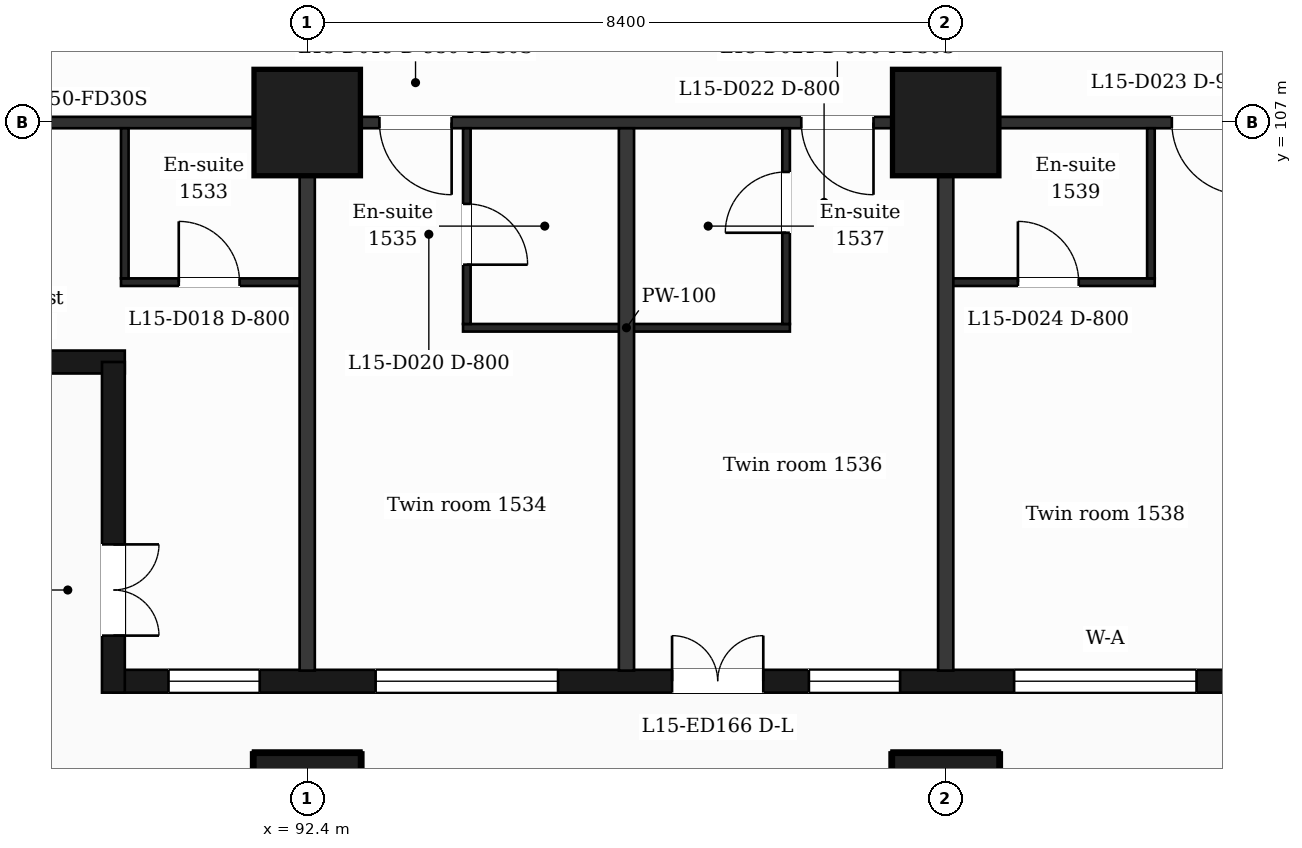
"""IFC4 building model, lengths in metres.
Left out: names, types, materials, properties, quantities, classifications, styles, units other than length and angle.
Written with IfcOpenShell. Run it as: python <this file> out.ifc"""

import sys

from ifc_helpers import new_model, si_unit, direction, frame, frame_2d, origin, origin_2d, place, context, subcontext, project, spatial, rectangle, extrude, element, fill, save


model = new_model("IFC4")
c1 = context("Model", 3, precision=1e-05, world=origin(), true_north=direction((0.0, 1.0)))
c2 = subcontext(c1, "Body", "Model", "MODEL_VIEW")
j1 = project(units=[si_unit("LENGTHUNIT", "METRE"), si_unit("PLANEANGLEUNIT", "RADIAN")], contexts=[c1])
p1 = place(None, origin())
s1 = spatial("IfcSite", under=j1, at=p1, CompositionType="ELEMENT")
p2 = place(p1, origin())
s2 = spatial("IfcBuilding", under=s1, at=p2, CompositionType="ELEMENT")
p3 = place(p2, frame((0.0, 0.0, 70.5)))
s3 = spatial("IfcBuildingStorey", under=s2, at=p3, CompositionType="ELEMENT", Elevation=70.5)
for number, where, z_axis, x_axis in (
    (1, (92.4, 98.0, 0.0), (0.0, 0.0, 1.0), (1.0, 0.0, 0.0)),
    (2, (100.8, 98.0, 0.0), (0.0, 0.0, 1.0), (1.0, 0.0, 0.0)),
    (3, (92.4, 107.0, 0.0), (0.0, 0.0, 1.0), (1.0, 0.0, 0.0)),
    (4, (100.8, 107.0, 0.0), (0.0, 0.0, 1.0), (1.0, 0.0, 0.0)),
):
    element("IfcColumn", number, at=place(p3, frame(where, z_axis=z_axis, x_axis=x_axis)), inside=s3, PredefinedType="COLUMN", context=c2, shape_type="SweptSolid", body=[
        extrude(rectangle(XDim=1.4, YDim=1.4, at=origin_2d()), origin(), (0.0, 0.0, 1.0), 3.5),
    ])
p4 = place(p3, frame((89.85, 99.65, 0.0), z_axis=(0.0, 0.0, 1.0), x_axis=(1.0, 0.0, 0.0)))
e5 = element("IfcWall", 5, at=p4, inside=s3, PredefinedType="SOLIDWALL", context=c2, shape_type="SweptSolid", body=[
    extrude(rectangle(XDim=47.25, YDim=0.3, at=frame_2d((23.625, 0.0))), origin(), (0.0, 0.0, 1.0), 3.18),
])
p5 = place(p4, frame((0.725, 0.0, 0.9)))
e6 = element("IfcOpeningElement", 6, at=p5, cuts=e5, PredefinedType="OPENING", context=c2, shape_type="SweptSolid", body=[
    extrude(rectangle(XDim=1.2, YDim=2.1, at=frame_2d((0.6, 1.05))), frame((0.0, 0.16, 0.0), z_axis=(0.0, -1.0, 0.0), x_axis=(1.0, 0.0, 0.0)), (0.0, 0.0, 1.0), 0.32),
])
p6 = place(p4, frame((3.45, 0.0, 0.9)))
e7 = element("IfcOpeningElement", 7, at=p6, cuts=e5, PredefinedType="OPENING", context=c2, shape_type="SweptSolid", body=[
    extrude(rectangle(XDim=2.4, YDim=2.1, at=frame_2d((1.2, 1.05))), frame((0.0, 0.16, 0.0), z_axis=(0.0, -1.0, 0.0), x_axis=(1.0, 0.0, 0.0)), (0.0, 0.0, 1.0), 0.32),
])
p7 = place(p4, frame((7.35, 0.0, 0.0)))
e8 = element("IfcOpeningElement", 8, at=p7, cuts=e5, PredefinedType="OPENING", context=c2, shape_type="SweptSolid", body=[
    extrude(rectangle(XDim=1.2, YDim=2.4, at=frame_2d((0.6, 1.2))), frame((0.0, 0.16, 0.0), z_axis=(0.0, -1.0, 0.0), x_axis=(1.0, 0.0, 0.0)), (0.0, 0.0, 1.0), 0.32),
])
p8 = place(p4, frame((9.15, 0.0, 0.9)))
e9 = element("IfcOpeningElement", 9, at=p8, cuts=e5, PredefinedType="OPENING", context=c2, shape_type="SweptSolid", body=[
    extrude(rectangle(XDim=1.2, YDim=2.1, at=frame_2d((0.6, 1.05))), frame((0.0, 0.16, 0.0), z_axis=(0.0, -1.0, 0.0), x_axis=(1.0, 0.0, 0.0)), (0.0, 0.0, 1.0), 0.32),
])
p9 = place(p4, frame((11.85, 0.0, 0.9)))
e10 = element("IfcOpeningElement", 10, at=p9, cuts=e5, PredefinedType="OPENING", context=c2, shape_type="SweptSolid", body=[
    extrude(rectangle(XDim=2.4, YDim=2.1, at=frame_2d((1.2, 1.05))), frame((0.0, 0.16, 0.0), z_axis=(0.0, -1.0, 0.0), x_axis=(1.0, 0.0, 0.0)), (0.0, 0.0, 1.0), 0.32),
])
p10 = place(p4, frame((16.05, 0.0, 0.9)))
e11 = element("IfcOpeningElement", 11, at=p10, cuts=e5, PredefinedType="OPENING", context=c2, shape_type="SweptSolid", body=[
    extrude(rectangle(XDim=2.4, YDim=2.1, at=frame_2d((1.2, 1.05))), frame((0.0, 0.16, 0.0), z_axis=(0.0, -1.0, 0.0), x_axis=(1.0, 0.0, 0.0)), (0.0, 0.0, 1.0), 0.32),
])
p11 = place(p4, frame((20.85, 0.0, 0.9)))
e12 = element("IfcOpeningElement", 12, at=p11, cuts=e5, PredefinedType="OPENING", context=c2, shape_type="SweptSolid", body=[
    extrude(rectangle(XDim=1.2, YDim=2.1, at=frame_2d((0.6, 1.05))), frame((0.0, 0.16, 0.0), z_axis=(0.0, -1.0, 0.0), x_axis=(1.0, 0.0, 0.0)), (0.0, 0.0, 1.0), 0.32),
])
p12 = place(p4, frame((25.05, 0.0, 0.9)))
e13 = element("IfcOpeningElement", 13, at=p12, cuts=e5, PredefinedType="OPENING", context=c2, shape_type="SweptSolid", body=[
    extrude(rectangle(XDim=1.2, YDim=2.1, at=frame_2d((0.6, 1.05))), frame((0.0, 0.16, 0.0), z_axis=(0.0, -1.0, 0.0), x_axis=(1.0, 0.0, 0.0)), (0.0, 0.0, 1.0), 0.32),
])
p13 = place(p4, frame((28.65, 0.0, 0.9)))
e14 = element("IfcOpeningElement", 14, at=p13, cuts=e5, PredefinedType="OPENING", context=c2, shape_type="SweptSolid", body=[
    extrude(rectangle(XDim=2.4, YDim=2.1, at=frame_2d((1.2, 1.05))), frame((0.0, 0.16, 0.0), z_axis=(0.0, -1.0, 0.0), x_axis=(1.0, 0.0, 0.0)), (0.0, 0.0, 1.0), 0.32),
])
p14 = place(p4, frame((32.85, 0.0, 0.9)))
e15 = element("IfcOpeningElement", 15, at=p14, cuts=e5, PredefinedType="OPENING", context=c2, shape_type="SweptSolid", body=[
    extrude(rectangle(XDim=2.4, YDim=2.1, at=frame_2d((1.2, 1.05))), frame((0.0, 0.16, 0.0), z_axis=(0.0, -1.0, 0.0), x_axis=(1.0, 0.0, 0.0)), (0.0, 0.0, 1.0), 0.32),
])
p15 = place(p4, frame((37.05, 0.0, 0.9)))
e16 = element("IfcOpeningElement", 16, at=p15, cuts=e5, PredefinedType="OPENING", context=c2, shape_type="SweptSolid", body=[
    extrude(rectangle(XDim=2.4, YDim=2.1, at=frame_2d((1.2, 1.05))), frame((0.0, 0.16, 0.0), z_axis=(0.0, -1.0, 0.0), x_axis=(1.0, 0.0, 0.0)), (0.0, 0.0, 1.0), 0.32),
])
p16 = place(p4, frame((41.25, 0.0, 0.9)))
e17 = element("IfcOpeningElement", 17, at=p16, cuts=e5, PredefinedType="OPENING", context=c2, shape_type="SweptSolid", body=[
    extrude(rectangle(XDim=2.4, YDim=2.1, at=frame_2d((1.2, 1.05))), frame((0.0, 0.16, 0.0), z_axis=(0.0, -1.0, 0.0), x_axis=(1.0, 0.0, 0.0)), (0.0, 0.0, 1.0), 0.32),
])
p17 = place(p4, frame((45.25, 0.0, 0.9)))
e18 = element("IfcOpeningElement", 18, at=p17, cuts=e5, PredefinedType="OPENING", context=c2, shape_type="SweptSolid", body=[
    extrude(rectangle(XDim=1.2, YDim=2.1, at=frame_2d((0.6, 1.05))), frame((0.0, 0.16, 0.0), z_axis=(0.0, -1.0, 0.0), x_axis=(1.0, 0.0, 0.0)), (0.0, 0.0, 1.0), 0.32),
])
p18 = place(p3, frame((86.452, 103.85, 0.0), z_axis=(0.0, 0.0, 1.0), x_axis=(1.0, 0.0, 0.0)))
e19 = element("IfcWall", 19, at=p18, inside=s3, PredefinedType="SOLIDWALL", context=c2, shape_type="SweptSolid", body=[
    extrude(rectangle(XDim=3.548, YDim=0.3, at=frame_2d((1.774, 0.0))), origin(), (0.0, 0.0, 1.0), 3.18),
])
p19 = place(p3, frame((89.85, 103.85, 0.0), z_axis=(0.0, 0.0, 1.0), x_axis=(0.0, -1.0, 0.0)))
e20 = element("IfcWall", 20, at=p19, inside=s3, PredefinedType="SOLIDWALL", context=c2, shape_type="SweptSolid", body=[
    extrude(rectangle(XDim=4.35, YDim=0.3, at=frame_2d((2.175, 0.0))), origin(), (0.0, 0.0, 1.0), 3.18),
])
p20 = place(p19, frame((2.4, 0.0, 0.0)))
e21 = element("IfcOpeningElement", 21, at=p20, cuts=e20, PredefinedType="OPENING", context=c2, shape_type="SweptSolid", body=[
    extrude(rectangle(XDim=1.2, YDim=2.4, at=frame_2d((0.6, 1.2))), frame((0.0, 0.16, 0.0), z_axis=(0.0, -1.0, 0.0), x_axis=(1.0, 0.0, 0.0)), (0.0, 0.0, 1.0), 0.32),
])
p21 = place(p3, frame((94.45, 104.3, 0.0), z_axis=(0.0, 0.0, 1.0), x_axis=(1.0, 0.0, 0.0)))
e22 = element("IfcWall", 22, at=p21, inside=s3, PredefinedType="PARTITIONING", context=c2, shape_type="SweptSolid", body=[
    extrude(rectangle(XDim=4.3, YDim=0.1, at=frame_2d((2.15, 0.0))), origin(), (0.0, 0.0, 1.0), 3.18),
])
p22 = place(p3, frame((89.95, 104.9, 0.0), z_axis=(0.0, 0.0, 1.0), x_axis=(1.0, 0.0, 0.0)))
e23 = element("IfcWall", 23, at=p22, inside=s3, PredefinedType="PARTITIONING", context=c2, shape_type="SweptSolid", body=[
    extrude(rectangle(XDim=2.45, YDim=0.1, at=frame_2d((1.225, 0.0))), origin(), (0.0, 0.0, 1.0), 3.18),
])
p23 = place(p22, frame((0.76, 0.0, 0.0)))
e24 = element("IfcOpeningElement", 24, at=p23, cuts=e23, PredefinedType="OPENING", context=c2, shape_type="SweptSolid", body=[
    extrude(rectangle(XDim=0.8, YDim=2.1, at=frame_2d((0.4, 1.05))), frame((0.0, 0.06, 0.0), z_axis=(0.0, -1.0, 0.0), x_axis=(1.0, 0.0, 0.0)), (0.0, 0.0, 1.0), 0.12),
])
p24 = place(p3, frame((100.8, 104.9, 0.0), z_axis=(0.0, 0.0, 1.0), x_axis=(1.0, 0.0, 0.0)))
e25 = element("IfcWall", 25, at=p24, inside=s3, PredefinedType="PARTITIONING", context=c2, shape_type="SweptSolid", body=[
    extrude(rectangle(XDim=2.75, YDim=0.1, at=frame_2d((1.375, 0.0))), origin(), (0.0, 0.0, 1.0), 3.18),
])
p25 = place(p24, frame((0.95, 0.0, 0.0)))
e26 = element("IfcOpeningElement", 26, at=p25, cuts=e25, PredefinedType="OPENING", context=c2, shape_type="SweptSolid", body=[
    extrude(rectangle(XDim=0.8, YDim=2.1, at=frame_2d((0.4, 1.05))), frame((0.0, 0.06, 0.0), z_axis=(0.0, -1.0, 0.0), x_axis=(1.0, 0.0, 0.0)), (0.0, 0.0, 1.0), 0.12),
])
p26 = place(p3, frame((87.018, 107.0, 0.0), z_axis=(0.0, 0.0, 1.0), x_axis=(1.0, 0.0, 0.0)))
e27 = element("IfcWall", 27, at=p26, inside=s3, PredefinedType="PARTITIONING", context=c2, shape_type="SweptSolid", body=[
    extrude(rectangle(XDim=52.765, YDim=0.15, at=frame_2d((26.382, 0.0))), origin(), (0.0, 0.0, 1.0), 3.18),
])
p27 = place(p26, frame((0.87, 0.0, 0.0)))
e28 = element("IfcOpeningElement", 28, at=p27, cuts=e27, PredefinedType="OPENING", context=c2, shape_type="SweptSolid", body=[
    extrude(rectangle(XDim=0.95, YDim=2.1, at=frame_2d((0.475, 1.05))), frame((0.0, 0.085, 0.0), z_axis=(0.0, -1.0, 0.0), x_axis=(1.0, 0.0, 0.0)), (0.0, 0.0, 1.0), 0.17),
])
p28 = place(p26, frame((6.332, 0.0, 0.0)))
e29 = element("IfcOpeningElement", 29, at=p28, cuts=e27, PredefinedType="OPENING", context=c2, shape_type="SweptSolid", body=[
    extrude(rectangle(XDim=0.95, YDim=2.1, at=frame_2d((0.475, 1.05))), frame((0.0, 0.085, 0.0), z_axis=(0.0, -1.0, 0.0), x_axis=(1.0, 0.0, 0.0)), (0.0, 0.0, 1.0), 0.17),
])
p29 = place(p26, frame((11.882, 0.0, 0.0)))
e30 = element("IfcOpeningElement", 30, at=p29, cuts=e27, PredefinedType="OPENING", context=c2, shape_type="SweptSolid", body=[
    extrude(rectangle(XDim=0.95, YDim=2.1, at=frame_2d((0.475, 1.05))), frame((0.0, 0.085, 0.0), z_axis=(0.0, -1.0, 0.0), x_axis=(1.0, 0.0, 0.0)), (0.0, 0.0, 1.0), 0.17),
])
p30 = place(p26, frame((16.757, 0.0, 0.0)))
e31 = element("IfcOpeningElement", 31, at=p30, cuts=e27, PredefinedType="OPENING", context=c2, shape_type="SweptSolid", body=[
    extrude(rectangle(XDim=0.95, YDim=2.1, at=frame_2d((0.475, 1.05))), frame((0.0, 0.085, 0.0), z_axis=(0.0, -1.0, 0.0), x_axis=(1.0, 0.0, 0.0)), (0.0, 0.0, 1.0), 0.17),
])
p31 = place(p26, frame((20.319, 0.0, 0.0)))
e32 = element("IfcOpeningElement", 32, at=p31, cuts=e27, PredefinedType="OPENING", context=c2, shape_type="SweptSolid", body=[
    extrude(rectangle(XDim=0.95, YDim=2.1, at=frame_2d((0.475, 1.05))), frame((0.0, 0.085, 0.0), z_axis=(0.0, -1.0, 0.0), x_axis=(1.0, 0.0, 0.0)), (0.0, 0.0, 1.0), 0.17),
])
p32 = place(p26, frame((23.132, 0.0, 0.0)))
e33 = element("IfcOpeningElement", 33, at=p32, cuts=e27, PredefinedType="OPENING", context=c2, shape_type="SweptSolid", body=[
    extrude(rectangle(XDim=0.95, YDim=2.1, at=frame_2d((0.475, 1.05))), frame((0.0, 0.085, 0.0), z_axis=(0.0, -1.0, 0.0), x_axis=(1.0, 0.0, 0.0)), (0.0, 0.0, 1.0), 0.17),
])
p33 = place(p26, frame((26.657, 0.0, 0.0)))
e34 = element("IfcOpeningElement", 34, at=p33, cuts=e27, PredefinedType="OPENING", context=c2, shape_type="SweptSolid", body=[
    extrude(rectangle(XDim=0.95, YDim=2.1, at=frame_2d((0.475, 1.05))), frame((0.0, 0.085, 0.0), z_axis=(0.0, -1.0, 0.0), x_axis=(1.0, 0.0, 0.0)), (0.0, 0.0, 1.0), 0.17),
])
p34 = place(p26, frame((34.952, 0.0, 0.0)))
e35 = element("IfcOpeningElement", 35, at=p34, cuts=e27, PredefinedType="OPENING", context=c2, shape_type="SweptSolid", body=[
    extrude(rectangle(XDim=1.0, YDim=2.1, at=frame_2d((0.5, 1.05))), frame((0.0, 0.085, 0.0), z_axis=(0.0, -1.0, 0.0), x_axis=(1.0, 0.0, 0.0)), (0.0, 0.0, 1.0), 0.17),
])
p35 = place(p26, frame((45.062, 0.0, 0.0)))
e36 = element("IfcOpeningElement", 36, at=p35, cuts=e27, PredefinedType="OPENING", context=c2, shape_type="SweptSolid", body=[
    extrude(rectangle(XDim=0.95, YDim=2.1, at=frame_2d((0.475, 1.05))), frame((0.0, 0.085, 0.0), z_axis=(0.0, -1.0, 0.0), x_axis=(1.0, 0.0, 0.0)), (0.0, 0.0, 1.0), 0.17),
])
p36 = place(p26, frame((49.285, 0.0, 0.0)))
e37 = element("IfcOpeningElement", 37, at=p36, cuts=e27, PredefinedType="OPENING", context=c2, shape_type="SweptSolid", body=[
    extrude(rectangle(XDim=0.95, YDim=2.1, at=frame_2d((0.475, 1.05))), frame((0.0, 0.085, 0.0), z_axis=(0.0, -1.0, 0.0), x_axis=(1.0, 0.0, 0.0)), (0.0, 0.0, 1.0), 0.17),
])
p37 = place(p3, frame((90.0, 104.95, 0.0), z_axis=(0.0, 0.0, 1.0), x_axis=(0.0, 1.0, 0.0)))
e38 = element("IfcWall", 38, at=p37, inside=s3, PredefinedType="PARTITIONING", context=c2, shape_type="SweptSolid", body=[
    extrude(rectangle(XDim=1.975, YDim=0.1, at=frame_2d((0.988, 0.0))), origin(), (0.0, 0.0, 1.0), 3.18),
])
p38 = place(p3, frame((92.4, 99.79, 0.0), z_axis=(0.0, 0.0, 1.0), x_axis=(0.0, 1.0, 0.0)))
e39 = element("IfcWall", 39, at=p38, inside=s3, PredefinedType="PARTITIONING", context=c2, shape_type="SweptSolid", body=[
    extrude(rectangle(XDim=7.135, YDim=0.2, at=frame_2d((3.567, 0.0))), origin(), (0.0, 0.0, 1.0), 3.18),
])
p39 = place(p3, frame((94.5, 104.35, 0.0), z_axis=(0.0, 0.0, 1.0), x_axis=(0.0, 1.0, 0.0)))
e40 = element("IfcWall", 40, at=p39, inside=s3, PredefinedType="PARTITIONING", context=c2, shape_type="SweptSolid", body=[
    extrude(rectangle(XDim=2.575, YDim=0.1, at=frame_2d((1.288, 0.0))), origin(), (0.0, 0.0, 1.0), 3.18),
])
p40 = place(p39, frame((0.78, 0.0, 0.0)))
e41 = element("IfcOpeningElement", 41, at=p40, cuts=e40, PredefinedType="OPENING", context=c2, shape_type="SweptSolid", body=[
    extrude(rectangle(XDim=0.8, YDim=2.1, at=frame_2d((0.4, 1.05))), frame((0.0, 0.06, 0.0), z_axis=(0.0, -1.0, 0.0), x_axis=(1.0, 0.0, 0.0)), (0.0, 0.0, 1.0), 0.12),
])
p41 = place(p3, frame((96.6, 99.79, 0.0), z_axis=(0.0, 0.0, 1.0), x_axis=(0.0, 1.0, 0.0)))
e42 = element("IfcWall", 42, at=p41, inside=s3, PredefinedType="PARTITIONING", context=c2, shape_type="SweptSolid", body=[
    extrude(rectangle(XDim=7.135, YDim=0.2, at=frame_2d((3.567, 0.0))), origin(), (0.0, 0.0, 1.0), 3.18),
])
p42 = place(p3, frame((98.7, 104.35, 0.0), z_axis=(0.0, 0.0, 1.0), x_axis=(0.0, 1.0, 0.0)))
e43 = element("IfcWall", 43, at=p42, inside=s3, PredefinedType="PARTITIONING", context=c2, shape_type="SweptSolid", body=[
    extrude(rectangle(XDim=2.575, YDim=0.1, at=frame_2d((1.288, 0.0))), origin(), (0.0, 0.0, 1.0), 3.18),
])
p43 = place(p42, frame((1.2, 0.0, 0.0)))
e44 = element("IfcOpeningElement", 44, at=p43, cuts=e43, PredefinedType="OPENING", context=c2, shape_type="SweptSolid", body=[
    extrude(rectangle(XDim=0.8, YDim=2.1, at=frame_2d((0.4, 1.05))), frame((0.0, 0.06, 0.0), z_axis=(0.0, -1.0, 0.0), x_axis=(1.0, 0.0, 0.0)), (0.0, 0.0, 1.0), 0.12),
])
p44 = place(p3, frame((100.8, 99.79, 0.0), z_axis=(0.0, 0.0, 1.0), x_axis=(0.0, 1.0, 0.0)))
e45 = element("IfcWall", 45, at=p44, inside=s3, PredefinedType="PARTITIONING", context=c2, shape_type="SweptSolid", body=[
    extrude(rectangle(XDim=7.135, YDim=0.2, at=frame_2d((3.567, 0.0))), origin(), (0.0, 0.0, 1.0), 3.18),
])
p45 = place(p3, frame((103.5, 104.95, 0.0), z_axis=(0.0, 0.0, 1.0), x_axis=(0.0, 1.0, 0.0)))
e46 = element("IfcWall", 46, at=p45, inside=s3, PredefinedType="PARTITIONING", context=c2, shape_type="SweptSolid", body=[
    extrude(rectangle(XDim=1.975, YDim=0.1, at=frame_2d((0.988, 0.0))), origin(), (0.0, 0.0, 1.0), 3.18),
])
p46 = place(p5, origin())
e47 = element("IfcWindow", 47, at=p46, inside=s3, PartitioningType="SINGLE_PANEL", PredefinedType="WINDOW", context=c2, shape_type="SweptSolid", body=[
    extrude(rectangle(XDim=1.2, YDim=2.1, at=frame_2d((0.6, 1.05))), frame((0.0, 0.03, 0.0), z_axis=(0.0, -1.0, 0.0), x_axis=(1.0, 0.0, 0.0)), (0.0, 0.0, 1.0), 0.06),
])
fill(e6, e47)
p47 = place(p6, origin())
e48 = element("IfcWindow", 48, at=p47, inside=s3, PartitioningType="SINGLE_PANEL", PredefinedType="WINDOW", context=c2, shape_type="SweptSolid", body=[
    extrude(rectangle(XDim=2.4, YDim=2.1, at=frame_2d((1.2, 1.05))), frame((0.0, 0.03, 0.0), z_axis=(0.0, -1.0, 0.0), x_axis=(1.0, 0.0, 0.0)), (0.0, 0.0, 1.0), 0.06),
])
fill(e7, e48)
p48 = place(p7, origin())
e49 = element("IfcDoor", 49, at=p48, inside=s3, OperationType="DOUBLE_DOOR_SINGLE_SWING", PredefinedType="DOOR", context=c2, shape_type="SweptSolid", body=[
    extrude(rectangle(XDim=1.2, YDim=2.4, at=frame_2d((0.6, 1.2))), frame((0.0, 0.025, 0.0), z_axis=(0.0, -1.0, 0.0), x_axis=(1.0, 0.0, 0.0)), (0.0, 0.0, 1.0), 0.05),
])
fill(e8, e49)
p49 = place(p8, origin())
e50 = element("IfcWindow", 50, at=p49, inside=s3, PartitioningType="SINGLE_PANEL", PredefinedType="WINDOW", context=c2, shape_type="SweptSolid", body=[
    extrude(rectangle(XDim=1.2, YDim=2.1, at=frame_2d((0.6, 1.05))), frame((0.0, 0.03, 0.0), z_axis=(0.0, -1.0, 0.0), x_axis=(1.0, 0.0, 0.0)), (0.0, 0.0, 1.0), 0.06),
])
fill(e9, e50)
p50 = place(p9, origin())
e51 = element("IfcWindow", 51, at=p50, inside=s3, PartitioningType="SINGLE_PANEL", PredefinedType="WINDOW", context=c2, shape_type="SweptSolid", body=[
    extrude(rectangle(XDim=2.4, YDim=2.1, at=frame_2d((1.2, 1.05))), frame((0.0, 0.03, 0.0), z_axis=(0.0, -1.0, 0.0), x_axis=(1.0, 0.0, 0.0)), (0.0, 0.0, 1.0), 0.06),
])
fill(e10, e51)
p51 = place(p20, origin())
e52 = element("IfcDoor", 52, at=p51, inside=s3, OperationType="DOUBLE_DOOR_SINGLE_SWING", PredefinedType="DOOR", context=c2, shape_type="SweptSolid", body=[
    extrude(rectangle(XDim=1.2, YDim=2.4, at=frame_2d((0.6, 1.2))), frame((0.0, 0.025, 0.0), z_axis=(0.0, -1.0, 0.0), x_axis=(1.0, 0.0, 0.0)), (0.0, 0.0, 1.0), 0.05),
])
fill(e21, e52)
p52 = place(p23, origin())
e53 = element("IfcDoor", 53, at=p52, inside=s3, OperationType="SINGLE_SWING_LEFT", PredefinedType="DOOR", context=c2, shape_type="SweptSolid", body=[
    extrude(rectangle(XDim=0.8, YDim=2.1, at=frame_2d((0.4, 1.05))), frame((0.0, 0.025, 0.0), z_axis=(0.0, -1.0, 0.0), x_axis=(1.0, 0.0, 0.0)), (0.0, 0.0, 1.0), 0.05),
])
fill(e24, e53)
p53 = place(p28, origin())
e54 = element("IfcDoor", 54, at=p53, inside=s3, OperationType="SINGLE_SWING_RIGHT", PredefinedType="DOOR", context=c2, shape_type="SweptSolid", body=[
    extrude(rectangle(XDim=0.95, YDim=2.1, at=frame_2d((0.475, 1.05))), frame((0.0, 0.025, 0.0), z_axis=(0.0, -1.0, 0.0), x_axis=(1.0, 0.0, 0.0)), (0.0, 0.0, 1.0), 0.05),
])
fill(e29, e54)
p54 = place(p40, origin())
e55 = element("IfcDoor", 55, at=p54, inside=s3, OperationType="SINGLE_SWING_LEFT", PredefinedType="DOOR", context=c2, shape_type="SweptSolid", body=[
    extrude(rectangle(XDim=0.8, YDim=2.1, at=frame_2d((0.4, 1.05))), frame((0.0, 0.025, 0.0), z_axis=(0.0, -1.0, 0.0), x_axis=(1.0, 0.0, 0.0)), (0.0, 0.0, 1.0), 0.05),
])
fill(e41, e55)
p55 = place(p29, origin())
e56 = element("IfcDoor", 56, at=p55, inside=s3, OperationType="SINGLE_SWING_RIGHT", PredefinedType="DOOR", context=c2, shape_type="SweptSolid", body=[
    extrude(rectangle(XDim=0.95, YDim=2.1, at=frame_2d((0.475, 1.05))), frame((0.0, 0.025, 0.0), z_axis=(0.0, -1.0, 0.0), x_axis=(1.0, 0.0, 0.0)), (0.0, 0.0, 1.0), 0.05),
])
fill(e30, e56)
p56 = place(p43, origin())
e57 = element("IfcDoor", 57, at=p56, inside=s3, OperationType="SINGLE_SWING_LEFT", PredefinedType="DOOR", context=c2, shape_type="SweptSolid", body=[
    extrude(rectangle(XDim=0.8, YDim=2.1, at=frame_2d((0.4, 1.05))), frame((0.0, 0.025, 0.0), z_axis=(0.0, -1.0, 0.0), x_axis=(1.0, 0.0, 0.0)), (0.0, 0.0, 1.0), 0.05),
])
fill(e44, e57)
p57 = place(p30, origin())
e58 = element("IfcDoor", 58, at=p57, inside=s3, OperationType="SINGLE_SWING_RIGHT", PredefinedType="DOOR", context=c2, shape_type="SweptSolid", body=[
    extrude(rectangle(XDim=0.95, YDim=2.1, at=frame_2d((0.475, 1.05))), frame((0.0, 0.025, 0.0), z_axis=(0.0, -1.0, 0.0), x_axis=(1.0, 0.0, 0.0)), (0.0, 0.0, 1.0), 0.05),
])
fill(e31, e58)
p58 = place(p25, origin())
e59 = element("IfcDoor", 59, at=p58, inside=s3, OperationType="SINGLE_SWING_LEFT", PredefinedType="DOOR", context=c2, shape_type="SweptSolid", body=[
    extrude(rectangle(XDim=0.8, YDim=2.1, at=frame_2d((0.4, 1.05))), frame((0.0, 0.025, 0.0), z_axis=(0.0, -1.0, 0.0), x_axis=(1.0, 0.0, 0.0)), (0.0, 0.0, 1.0), 0.05),
])
fill(e26, e59)
save(model, sys.argv[1])
